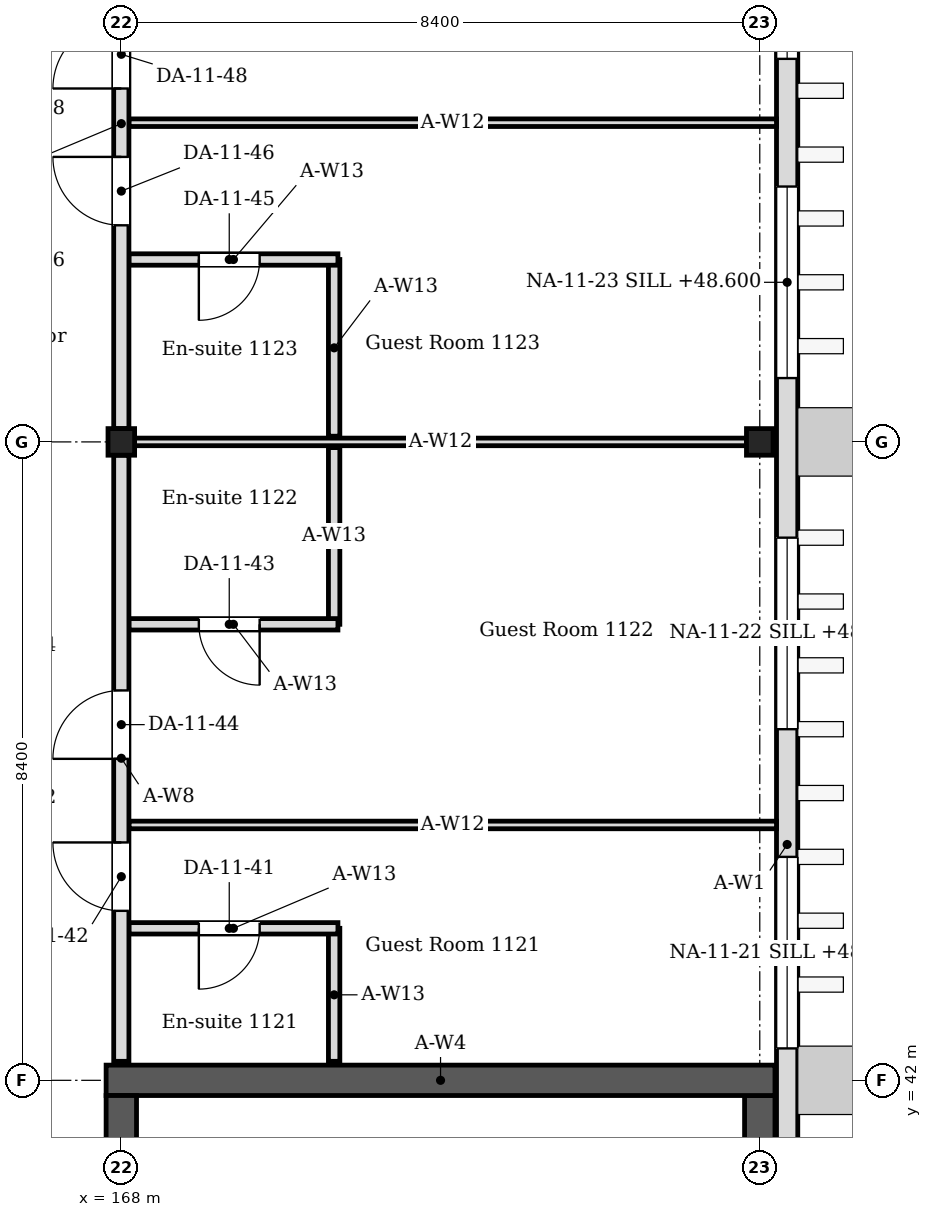
"""IFC4 building model, lengths in metres.
Left out: names, types, materials, properties, quantities, classifications, styles, units other than length and angle.
Written with IfcOpenShell. Run it as: python <this file> out.ifc"""

import sys

from ifc_helpers import new_model, si_unit, direction, frame, frame_2d, origin, origin_2d, place, context, subcontext, project, spatial, rectangle, i_section, extrude, element, fill, save


model = new_model("IFC4")
c1 = context("Model", 3, precision=1e-05, world=origin(), true_north=direction((0.0, 1.0)))
c2 = subcontext(c1, "Body", "Model", "MODEL_VIEW")
j1 = project(units=[si_unit("LENGTHUNIT", "METRE"), si_unit("PLANEANGLEUNIT", "RADIAN")], contexts=[c1])
p1 = place(None, origin())
s1 = spatial("IfcSite", under=j1, at=p1, CompositionType="ELEMENT")
p2 = place(p1, origin())
s2 = spatial("IfcBuilding", under=s1, at=p2, CompositionType="ELEMENT")
p3 = place(p2, frame((0.0, 0.0, 48.0)))
s3 = spatial("IfcBuildingStorey", under=s2, at=p3, CompositionType="ELEMENT", Elevation=48.0)
for number, where, z_axis, x_axis in (
    (1, (168.0, 50.4, 0.0), (0.0, 0.0, 1.0), (1.0, 0.0, 0.0)),
    (2, (176.4, 50.4, 0.0), (0.0, 0.0, 1.0), (1.0, 0.0, 0.0)),
):
    element("IfcColumn", number, at=place(p3, frame(where, z_axis=z_axis, x_axis=x_axis)), inside=s3, PredefinedType="COLUMN", context=c2, shape_type="SweptSolid", body=[
        extrude(i_section(OverallWidth=0.35, OverallDepth=0.35, WebThickness=0.012, FlangeThickness=0.019, FilletRadius=0.013, at=origin_2d()), origin(), (0.0, 0.0, 1.0), 4.2),
    ])
p4 = place(p3, frame((167.8, 42.0, 0.0), z_axis=(0.0, 0.0, 1.0), x_axis=(1.0, 0.0, 0.0)))
e3 = element("IfcWall", 3, at=p4, inside=s3, PredefinedType="SOLIDWALL", context=c2, shape_type="SweptSolid", body=[
    extrude(rectangle(XDim=8.8, YDim=0.4, at=frame_2d((4.4, 0.0))), origin(), (0.0, 0.0, 1.0), 4.05),
])
p5 = place(p3, frame((168.0, 25.4, 0.0), z_axis=(0.0, 0.0, 1.0), x_axis=(0.0, 1.0, 0.0)))
e4 = element("IfcWall", 4, at=p5, inside=s3, PredefinedType="SOLIDWALL", context=c2, shape_type="SweptSolid", body=[
    extrude(rectangle(XDim=16.4, YDim=0.4, at=frame_2d((8.2, 0.0))), origin(), (0.0, 0.0, 1.0), 4.05),
])
p6 = place(p5, frame((1.0, 0.0, 0.0)))
e5 = element("IfcOpeningElement", 5, at=p6, cuts=e4, PredefinedType="OPENING", context=c2, shape_type="SweptSolid", body=[
    extrude(rectangle(XDim=1.0, YDim=2.1, at=frame_2d((0.5, 1.05))), frame((0.0, 0.21, 0.0), z_axis=(0.0, -1.0, 0.0), x_axis=(1.0, 0.0, 0.0)), (0.0, 0.0, 1.0), 0.42),
])
p7 = place(p5, frame((14.4, 0.0, 0.0)))
e6 = element("IfcOpeningElement", 6, at=p7, cuts=e4, PredefinedType="OPENING", context=c2, shape_type="SweptSolid", body=[
    extrude(rectangle(XDim=1.4, YDim=2.1, at=frame_2d((0.7, 1.05))), frame((0.0, 0.21, 0.0), z_axis=(0.0, -1.0, 0.0), x_axis=(1.0, 0.0, 0.0)), (0.0, 0.0, 1.0), 0.42),
])
p8 = place(p3, frame((176.4, 25.4, 0.0), z_axis=(0.0, 0.0, 1.0), x_axis=(0.0, 1.0, 0.0)))
e7 = element("IfcWall", 7, at=p8, inside=s3, PredefinedType="SOLIDWALL", context=c2, shape_type="SweptSolid", body=[
    extrude(rectangle(XDim=16.4, YDim=0.4, at=frame_2d((8.2, 0.0))), origin(), (0.0, 0.0, 1.0), 4.05),
])
p9 = place(p3, frame((176.76, 24.85, 0.0), z_axis=(0.0, 0.0, 1.0), x_axis=(0.0, 1.0, 0.0)))
e8 = element("IfcWall", 8, at=p9, inside=s3, PredefinedType="SOLIDWALL", context=c2, shape_type="SweptSolid", body=[
    extrude(rectangle(XDim=42.57, YDim=0.28, at=frame_2d((21.285, 0.0))), origin(), (0.0, 0.0, 1.0), 4.05),
])
p10 = place(p9, frame((17.57, 0.0, 0.6)))
e9 = element("IfcOpeningElement", 9, at=p10, cuts=e8, PredefinedType="OPENING", context=c2, shape_type="SweptSolid", body=[
    extrude(rectangle(XDim=2.52, YDim=2.4, at=frame_2d((1.26, 1.2))), frame((0.0, 0.15, 0.0), z_axis=(0.0, -1.0, 0.0), x_axis=(1.0, 0.0, 0.0)), (0.0, 0.0, 1.0), 0.3),
])
p11 = place(p9, frame((21.77, 0.0, 0.6)))
e10 = element("IfcOpeningElement", 10, at=p11, cuts=e8, PredefinedType="OPENING", context=c2, shape_type="SweptSolid", body=[
    extrude(rectangle(XDim=2.52, YDim=2.4, at=frame_2d((1.26, 1.2))), frame((0.0, 0.15, 0.0), z_axis=(0.0, -1.0, 0.0), x_axis=(1.0, 0.0, 0.0)), (0.0, 0.0, 1.0), 0.3),
])
p12 = place(p9, frame((26.39, 0.0, 0.6)))
e11 = element("IfcOpeningElement", 11, at=p12, cuts=e8, PredefinedType="OPENING", context=c2, shape_type="SweptSolid", body=[
    extrude(rectangle(XDim=2.52, YDim=2.4, at=frame_2d((1.26, 1.2))), frame((0.0, 0.15, 0.0), z_axis=(0.0, -1.0, 0.0), x_axis=(1.0, 0.0, 0.0)), (0.0, 0.0, 1.0), 0.3),
])
p13 = place(p9, frame((30.59, 0.0, 0.6)))
e12 = element("IfcOpeningElement", 12, at=p13, cuts=e8, PredefinedType="OPENING", context=c2, shape_type="SweptSolid", body=[
    extrude(rectangle(XDim=2.52, YDim=2.4, at=frame_2d((1.26, 1.2))), frame((0.0, 0.15, 0.0), z_axis=(0.0, -1.0, 0.0), x_axis=(1.0, 0.0, 0.0)), (0.0, 0.0, 1.0), 0.3),
])
p14 = place(p3, frame((170.8, 42.25, 0.0), z_axis=(0.0, 0.0, 1.0), x_axis=(0.0, 1.0, 0.0)))
e13 = element("IfcWall", 13, at=p14, inside=s3, PredefinedType="PARTITIONING", context=c2, shape_type="SweptSolid", body=[
    extrude(rectangle(XDim=1.75, YDim=0.15, at=frame_2d((0.875, 0.0))), origin(), (0.0, 0.0, 1.0), 4.05),
])
p15 = place(p3, frame((170.85, 44.0, 0.0), z_axis=(0.0, 0.0, 1.0), x_axis=(-1.0, 0.0, 0.0)))
e14 = element("IfcWall", 14, at=p15, inside=s3, PredefinedType="PARTITIONING", context=c2, shape_type="SweptSolid", body=[
    extrude(rectangle(XDim=2.75, YDim=0.15, at=frame_2d((1.375, 0.0))), origin(), (0.0, 0.0, 1.0), 4.05),
])
p16 = place(p15, frame((1.03, 0.0, 0.0)))
e15 = element("IfcOpeningElement", 15, at=p16, cuts=e14, PredefinedType="OPENING", context=c2, shape_type="SweptSolid", body=[
    extrude(rectangle(XDim=0.8, YDim=2.1, at=frame_2d((0.4, 1.05))), frame((0.0, 0.085, 0.0), z_axis=(0.0, -1.0, 0.0), x_axis=(1.0, 0.0, 0.0)), (0.0, 0.0, 1.0), 0.17),
])
p17 = place(p3, frame((170.8, 48.0, 0.0), z_axis=(0.0, 0.0, 1.0), x_axis=(0.0, 1.0, 0.0)))
e16 = element("IfcWall", 16, at=p17, inside=s3, PredefinedType="PARTITIONING", context=c2, shape_type="SweptSolid", body=[
    extrude(rectangle(XDim=2.325, YDim=0.15, at=frame_2d((1.163, 0.0))), origin(), (0.0, 0.0, 1.0), 4.05),
])
p18 = place(p3, frame((170.85, 48.0, 0.0), z_axis=(0.0, 0.0, 1.0), x_axis=(-1.0, 0.0, 0.0)))
e17 = element("IfcWall", 17, at=p18, inside=s3, PredefinedType="PARTITIONING", context=c2, shape_type="SweptSolid", body=[
    extrude(rectangle(XDim=2.75, YDim=0.15, at=frame_2d((1.375, 0.0))), origin(), (0.0, 0.0, 1.0), 4.05),
])
p19 = place(p18, frame((1.03, 0.0, 0.0)))
e18 = element("IfcOpeningElement", 18, at=p19, cuts=e17, PredefinedType="OPENING", context=c2, shape_type="SweptSolid", body=[
    extrude(rectangle(XDim=0.8, YDim=2.1, at=frame_2d((0.4, 1.05))), frame((0.0, 0.085, 0.0), z_axis=(0.0, -1.0, 0.0), x_axis=(1.0, 0.0, 0.0)), (0.0, 0.0, 1.0), 0.17),
])
p20 = place(p3, frame((170.8, 50.475, 0.0), z_axis=(0.0, 0.0, 1.0), x_axis=(0.0, 1.0, 0.0)))
e19 = element("IfcWall", 19, at=p20, inside=s3, PredefinedType="PARTITIONING", context=c2, shape_type="SweptSolid", body=[
    extrude(rectangle(XDim=2.325, YDim=0.15, at=frame_2d((1.163, 0.0))), origin(), (0.0, 0.0, 1.0), 4.05),
])
p21 = place(p3, frame((170.85, 52.8, 0.0), z_axis=(0.0, 0.0, 1.0), x_axis=(-1.0, 0.0, 0.0)))
e20 = element("IfcWall", 20, at=p21, inside=s3, PredefinedType="PARTITIONING", context=c2, shape_type="SweptSolid", body=[
    extrude(rectangle(XDim=2.75, YDim=0.15, at=frame_2d((1.375, 0.0))), origin(), (0.0, 0.0, 1.0), 4.05),
])
p22 = place(p21, frame((1.03, 0.0, 0.0)))
e21 = element("IfcOpeningElement", 21, at=p22, cuts=e20, PredefinedType="OPENING", context=c2, shape_type="SweptSolid", body=[
    extrude(rectangle(XDim=0.8, YDim=2.1, at=frame_2d((0.4, 1.05))), frame((0.0, 0.085, 0.0), z_axis=(0.0, -1.0, 0.0), x_axis=(1.0, 0.0, 0.0)), (0.0, 0.0, 1.0), 0.17),
])
p23 = place(p3, frame((168.175, 50.4, 0.0), z_axis=(0.0, 0.0, 1.0), x_axis=(1.0, 0.0, 0.0)))
e22 = element("IfcWall", 22, at=p23, inside=s3, PredefinedType="PARTITIONING", context=c2, shape_type="SweptSolid", body=[
    extrude(rectangle(XDim=8.05, YDim=0.1, at=frame_2d((4.025, 0.0))), origin(), (0.0, 0.0, 1.0), 3.604),
])
for number, where, z_axis, x_axis in (
    (23, (168.1, 45.36, 0.0), (0.0, 0.0, 1.0), (1.0, 0.0, 0.0)),
    (24, (168.1, 54.6, 0.0), (0.0, 0.0, 1.0), (1.0, 0.0, 0.0)),
):
    element("IfcWall", number, at=place(p3, frame(where, z_axis=z_axis, x_axis=x_axis)), inside=s3, PredefinedType="PARTITIONING", context=c2, shape_type="SweptSolid", body=[
        extrude(rectangle(XDim=8.52, YDim=0.1, at=frame_2d((4.26, 0.0))), origin(), (0.0, 0.0, 1.0), 3.604),
    ])
p24 = place(p3, frame((168.0, 42.25, 0.0), z_axis=(0.0, 0.0, 1.0), x_axis=(0.0, 1.0, 0.0)))
e25 = element("IfcWall", 25, at=p24, inside=s3, PredefinedType="PARTITIONING", context=c2, shape_type="SweptSolid", body=[
    extrude(rectangle(XDim=7.975, YDim=0.2, at=frame_2d((3.988, 0.0))), origin(), (0.0, 0.0, 1.0), 3.45),
])
p25 = place(p24, frame((1.98, 0.0, 0.0)))
e26 = element("IfcOpeningElement", 26, at=p25, cuts=e25, PredefinedType="OPENING", context=c2, shape_type="SweptSolid", body=[
    extrude(rectangle(XDim=0.9, YDim=2.1, at=frame_2d((0.45, 1.05))), frame((0.0, 0.11, 0.0), z_axis=(0.0, -1.0, 0.0), x_axis=(1.0, 0.0, 0.0)), (0.0, 0.0, 1.0), 0.22),
])
p26 = place(p24, frame((3.98, 0.0, 0.0)))
e27 = element("IfcOpeningElement", 27, at=p26, cuts=e25, PredefinedType="OPENING", context=c2, shape_type="SweptSolid", body=[
    extrude(rectangle(XDim=0.9, YDim=2.1, at=frame_2d((0.45, 1.05))), frame((0.0, 0.11, 0.0), z_axis=(0.0, -1.0, 0.0), x_axis=(1.0, 0.0, 0.0)), (0.0, 0.0, 1.0), 0.22),
])
p27 = place(p3, frame((168.0, 50.575, 0.0), z_axis=(0.0, 0.0, 1.0), x_axis=(0.0, 1.0, 0.0)))
e28 = element("IfcWall", 28, at=p27, inside=s3, PredefinedType="PARTITIONING", context=c2, shape_type="SweptSolid", body=[
    extrude(rectangle(XDim=8.025, YDim=0.2, at=frame_2d((4.013, 0.0))), origin(), (0.0, 0.0, 1.0), 3.45),
])
p28 = place(p27, frame((2.675, 0.0, 0.0)))
e29 = element("IfcOpeningElement", 29, at=p28, cuts=e28, PredefinedType="OPENING", context=c2, shape_type="SweptSolid", body=[
    extrude(rectangle(XDim=0.9, YDim=2.1, at=frame_2d((0.45, 1.05))), frame((0.0, 0.11, 0.0), z_axis=(0.0, -1.0, 0.0), x_axis=(1.0, 0.0, 0.0)), (0.0, 0.0, 1.0), 0.22),
])
p29 = place(p27, frame((4.475, 0.0, 0.0)))
e30 = element("IfcOpeningElement", 30, at=p29, cuts=e28, PredefinedType="OPENING", context=c2, shape_type="SweptSolid", body=[
    extrude(rectangle(XDim=0.9, YDim=2.1, at=frame_2d((0.45, 1.05))), frame((0.0, 0.11, 0.0), z_axis=(0.0, -1.0, 0.0), x_axis=(1.0, 0.0, 0.0)), (0.0, 0.0, 1.0), 0.22),
])
p30 = place(p10, origin())
e31 = element("IfcWindow", 31, at=p30, inside=s3, PartitioningType="SINGLE_PANEL", PredefinedType="WINDOW", context=c2, shape_type="SweptSolid", body=[
    extrude(rectangle(XDim=2.52, YDim=2.4, at=frame_2d((1.26, 1.2))), frame((0.0, 0.03, 0.0), z_axis=(0.0, -1.0, 0.0), x_axis=(1.0, 0.0, 0.0)), (0.0, 0.0, 1.0), 0.06),
])
fill(e9, e31)
p31 = place(p11, origin())
e32 = element("IfcWindow", 32, at=p31, inside=s3, PartitioningType="SINGLE_PANEL", PredefinedType="WINDOW", context=c2, shape_type="SweptSolid", body=[
    extrude(rectangle(XDim=2.52, YDim=2.4, at=frame_2d((1.26, 1.2))), frame((0.0, 0.03, 0.0), z_axis=(0.0, -1.0, 0.0), x_axis=(1.0, 0.0, 0.0)), (0.0, 0.0, 1.0), 0.06),
])
fill(e10, e32)
p32 = place(p12, origin())
e33 = element("IfcWindow", 33, at=p32, inside=s3, PartitioningType="SINGLE_PANEL", PredefinedType="WINDOW", context=c2, shape_type="SweptSolid", body=[
    extrude(rectangle(XDim=2.52, YDim=2.4, at=frame_2d((1.26, 1.2))), frame((0.0, 0.03, 0.0), z_axis=(0.0, -1.0, 0.0), x_axis=(1.0, 0.0, 0.0)), (0.0, 0.0, 1.0), 0.06),
])
fill(e11, e33)
p33 = place(p13, origin())
e34 = element("IfcWindow", 34, at=p33, inside=s3, PartitioningType="SINGLE_PANEL", PredefinedType="WINDOW", context=c2, shape_type="SweptSolid", body=[
    extrude(rectangle(XDim=2.52, YDim=2.4, at=frame_2d((1.26, 1.2))), frame((0.0, 0.03, 0.0), z_axis=(0.0, -1.0, 0.0), x_axis=(1.0, 0.0, 0.0)), (0.0, 0.0, 1.0), 0.06),
])
fill(e12, e34)
p34 = place(p16, origin())
e35 = element("IfcDoor", 35, at=p34, inside=s3, OperationType="SINGLE_SWING_RIGHT", PredefinedType="DOOR", context=c2, shape_type="SweptSolid", body=[
    extrude(rectangle(XDim=0.8, YDim=2.1, at=frame_2d((0.4, 1.05))), frame((0.0, 0.025, 0.0), z_axis=(0.0, -1.0, 0.0), x_axis=(1.0, 0.0, 0.0)), (0.0, 0.0, 1.0), 0.05),
])
fill(e15, e35)
p35 = place(p25, origin())
e36 = element("IfcDoor", 36, at=p35, inside=s3, OperationType="SINGLE_SWING_RIGHT", PredefinedType="DOOR", context=c2, shape_type="SweptSolid", body=[
    extrude(rectangle(XDim=0.9, YDim=2.1, at=frame_2d((0.45, 1.05))), frame((0.0, 0.025, 0.0), z_axis=(0.0, -1.0, 0.0), x_axis=(1.0, 0.0, 0.0)), (0.0, 0.0, 1.0), 0.05),
])
fill(e26, e36)
p36 = place(p19, origin())
e37 = element("IfcDoor", 37, at=p36, inside=s3, OperationType="SINGLE_SWING_LEFT", PredefinedType="DOOR", context=c2, shape_type="SweptSolid", body=[
    extrude(rectangle(XDim=0.8, YDim=2.1, at=frame_2d((0.4, 1.05))), frame((0.0, 0.025, 0.0), z_axis=(0.0, -1.0, 0.0), x_axis=(1.0, 0.0, 0.0)), (0.0, 0.0, 1.0), 0.05),
])
fill(e18, e37)
p37 = place(p26, origin())
e38 = element("IfcDoor", 38, at=p37, inside=s3, OperationType="SINGLE_SWING_LEFT", PredefinedType="DOOR", context=c2, shape_type="SweptSolid", body=[
    extrude(rectangle(XDim=0.9, YDim=2.1, at=frame_2d((0.45, 1.05))), frame((0.0, 0.025, 0.0), z_axis=(0.0, -1.0, 0.0), x_axis=(1.0, 0.0, 0.0)), (0.0, 0.0, 1.0), 0.05),
])
fill(e27, e38)
p38 = place(p22, origin())
e39 = element("IfcDoor", 39, at=p38, inside=s3, OperationType="SINGLE_SWING_RIGHT", PredefinedType="DOOR", context=c2, shape_type="SweptSolid", body=[
    extrude(rectangle(XDim=0.8, YDim=2.1, at=frame_2d((0.4, 1.05))), frame((0.0, 0.025, 0.0), z_axis=(0.0, -1.0, 0.0), x_axis=(1.0, 0.0, 0.0)), (0.0, 0.0, 1.0), 0.05),
])
fill(e21, e39)
p39 = place(p28, origin())
e40 = element("IfcDoor", 40, at=p39, inside=s3, OperationType="SINGLE_SWING_RIGHT", PredefinedType="DOOR", context=c2, shape_type="SweptSolid", body=[
    extrude(rectangle(XDim=0.9, YDim=2.1, at=frame_2d((0.45, 1.05))), frame((0.0, 0.025, 0.0), z_axis=(0.0, -1.0, 0.0), x_axis=(1.0, 0.0, 0.0)), (0.0, 0.0, 1.0), 0.05),
])
fill(e29, e40)
p40 = place(p29, origin())
e41 = element("IfcDoor", 41, at=p40, inside=s3, OperationType="SINGLE_SWING_LEFT", PredefinedType="DOOR", context=c2, shape_type="SweptSolid", body=[
    extrude(rectangle(XDim=0.9, YDim=2.1, at=frame_2d((0.45, 1.05))), frame((0.0, 0.025, 0.0), z_axis=(0.0, -1.0, 0.0), x_axis=(1.0, 0.0, 0.0)), (0.0, 0.0, 1.0), 0.05),
])
fill(e30, e41)
save(model, sys.argv[1])
